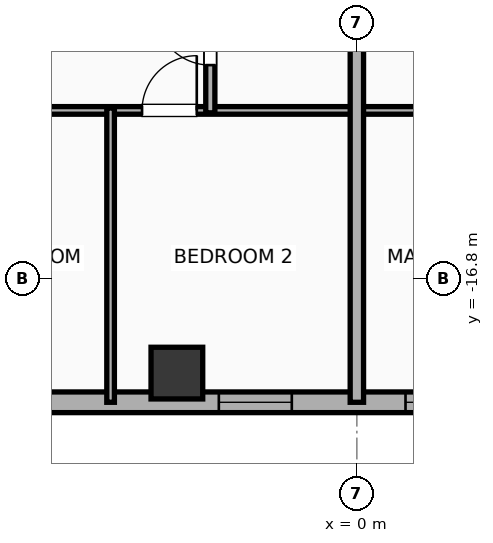
"""IFC4 building model, lengths in metres.
Left out: names, types, materials, properties, quantities, classifications, styles, units other than length and angle.
Written with IfcOpenShell. Run it as: python <this file> out.ifc"""

import sys

from ifc_helpers import new_model, si_unit, direction, frame, frame_2d, origin, origin_2d, place, context, subcontext, project, spatial, rectangle, hollow_rectangle, extrude, element, fill, save


model = new_model("IFC4")
c1 = context("Model", 3, precision=1e-05, world=origin(), true_north=direction((0.0, 1.0)))
c2 = subcontext(c1, "Body", "Model", "MODEL_VIEW")
j1 = project(units=[si_unit("LENGTHUNIT", "METRE"), si_unit("PLANEANGLEUNIT", "RADIAN")], contexts=[c1])
p1 = place(None, origin())
s1 = spatial("IfcSite", under=j1, at=p1, CompositionType="ELEMENT")
p2 = place(p1, origin())
s2 = spatial("IfcBuilding", under=s1, at=p2, CompositionType="ELEMENT")
p3 = place(p2, frame((0.0, 0.0, 215.8)))
s3 = spatial("IfcBuildingStorey", under=s2, at=p3, CompositionType="ELEMENT", Elevation=215.8)
p4 = place(p3, frame((-2.96, -18.35, 0.0), z_axis=(0.0, 0.0, 1.0), x_axis=(1.0, 0.0, 0.0)))
e1 = element("IfcColumn", 1, at=p4, inside=s3, PredefinedType="COLUMN", context=c2, shape_type="SweptSolid", body=[
    extrude(hollow_rectangle(XDim=0.85, YDim=0.85, WallThickness=0.028, at=origin_2d()), origin(), (0.0, 0.0, 1.0), 3.9),
])
p5 = place(p3, frame((26.783, -18.83, 0.0), z_axis=(0.0, 0.0, 1.0), x_axis=(-1.0, 0.0, 0.0)))
e2 = element("IfcWall", 2, at=p5, inside=s3, PredefinedType="ELEMENTEDWALL", context=c2, shape_type="SweptSolid", body=[
    extrude(rectangle(XDim=49.566, YDim=0.34, at=frame_2d((24.783, 0.0))), origin(), (0.0, 0.0, 1.0), 3.65),
])
p6 = place(p5, frame((23.583, 0.0, 0.75)))
e3 = element("IfcOpeningElement", 3, at=p6, cuts=e2, PredefinedType="OPENING", context=c2, shape_type="SweptSolid", body=[
    extrude(rectangle(XDim=2.4, YDim=2.1, at=frame_2d((1.2, 1.05))), frame((0.0, 0.18, 0.0), z_axis=(0.0, -1.0, 0.0), x_axis=(1.0, 0.0, 0.0)), (0.0, 0.0, 1.0), 0.36),
])
p7 = place(p5, frame((41.756, 0.0, 0.75)))
e4 = element("IfcOpeningElement", 4, at=p7, cuts=e2, PredefinedType="OPENING", context=c2, shape_type="SweptSolid", body=[
    extrude(rectangle(XDim=2.4, YDim=2.1, at=frame_2d((1.2, 1.05))), frame((0.0, 0.18, 0.0), z_axis=(0.0, -1.0, 0.0), x_axis=(1.0, 0.0, 0.0)), (0.0, 0.0, 1.0), 0.36),
])
p8 = place(p5, frame((47.222, 0.0, 0.75)))
e5 = element("IfcOpeningElement", 5, at=p8, cuts=e2, PredefinedType="OPENING", context=c2, shape_type="SweptSolid", body=[
    extrude(rectangle(XDim=1.2, YDim=2.05, at=frame_2d((0.6, 1.025))), frame((0.0, 0.18, 0.0), z_axis=(0.0, -1.0, 0.0), x_axis=(1.0, 0.0, 0.0)), (0.0, 0.0, 1.0), 0.36),
])
p9 = place(p5, frame((45.08, 0.0, 0.75)))
e6 = element("IfcOpeningElement", 6, at=p9, cuts=e2, PredefinedType="OPENING", context=c2, shape_type="SweptSolid", body=[
    extrude(rectangle(XDim=1.2, YDim=2.05, at=frame_2d((0.6, 1.025))), frame((0.0, 0.18, 0.0), z_axis=(0.0, -1.0, 0.0), x_axis=(1.0, 0.0, 0.0)), (0.0, 0.0, 1.0), 0.36),
])
p10 = place(p5, frame((37.289, 0.0, 0.75)))
e7 = element("IfcOpeningElement", 7, at=p10, cuts=e2, PredefinedType="OPENING", context=c2, shape_type="SweptSolid", body=[
    extrude(rectangle(XDim=1.2, YDim=2.05, at=frame_2d((0.6, 1.025))), frame((0.0, 0.18, 0.0), z_axis=(0.0, -1.0, 0.0), x_axis=(1.0, 0.0, 0.0)), (0.0, 0.0, 1.0), 0.36),
])
p11 = place(p5, frame((16.115, 0.0, 0.75)))
e8 = element("IfcOpeningElement", 8, at=p11, cuts=e2, PredefinedType="OPENING", context=c2, shape_type="SweptSolid", body=[
    extrude(rectangle(XDim=1.2, YDim=2.05, at=frame_2d((0.6, 1.025))), frame((0.0, 0.18, 0.0), z_axis=(0.0, -1.0, 0.0), x_axis=(1.0, 0.0, 0.0)), (0.0, 0.0, 1.0), 0.36),
])
p12 = place(p5, frame((12.422, 0.0, 0.75)))
e9 = element("IfcOpeningElement", 9, at=p12, cuts=e2, PredefinedType="OPENING", context=c2, shape_type="SweptSolid", body=[
    extrude(rectangle(XDim=1.2, YDim=2.05, at=frame_2d((0.6, 1.025))), frame((0.0, 0.18, 0.0), z_axis=(0.0, -1.0, 0.0), x_axis=(1.0, 0.0, 0.0)), (0.0, 0.0, 1.0), 0.36),
])
p13 = place(p5, frame((8.09, 0.0, 0.75)))
e10 = element("IfcOpeningElement", 10, at=p13, cuts=e2, PredefinedType="OPENING", context=c2, shape_type="SweptSolid", body=[
    extrude(rectangle(XDim=1.2, YDim=2.05, at=frame_2d((0.6, 1.025))), frame((0.0, 0.18, 0.0), z_axis=(0.0, -1.0, 0.0), x_axis=(1.0, 0.0, 0.0)), (0.0, 0.0, 1.0), 0.36),
])
p14 = place(p5, frame((4.637, 0.0, 0.75)))
e11 = element("IfcOpeningElement", 11, at=p14, cuts=e2, PredefinedType="OPENING", context=c2, shape_type="SweptSolid", body=[
    extrude(rectangle(XDim=1.2, YDim=2.05, at=frame_2d((0.6, 1.025))), frame((0.0, 0.18, 0.0), z_axis=(0.0, -1.0, 0.0), x_axis=(1.0, 0.0, 0.0)), (0.0, 0.0, 1.0), 0.36),
])
p15 = place(p5, frame((1.811, 0.0, 0.75)))
e12 = element("IfcOpeningElement", 12, at=p15, cuts=e2, PredefinedType="OPENING", context=c2, shape_type="SweptSolid", body=[
    extrude(rectangle(XDim=1.2, YDim=2.05, at=frame_2d((0.6, 1.025))), frame((0.0, 0.18, 0.0), z_axis=(0.0, -1.0, 0.0), x_axis=(1.0, 0.0, 0.0)), (0.0, 0.0, 1.0), 0.36),
])
p16 = place(p5, frame((32.253, 0.0, 0.75)))
e13 = element("IfcOpeningElement", 13, at=p16, cuts=e2, PredefinedType="OPENING", context=c2, shape_type="SweptSolid", body=[
    extrude(rectangle(XDim=1.2, YDim=2.05, at=frame_2d((0.6, 1.025))), frame((0.0, 0.18, 0.0), z_axis=(0.0, -1.0, 0.0), x_axis=(1.0, 0.0, 0.0)), (0.0, 0.0, 1.0), 0.36),
])
p17 = place(p5, frame((27.853, 0.0, 0.75)))
e14 = element("IfcOpeningElement", 14, at=p17, cuts=e2, PredefinedType="OPENING", context=c2, shape_type="SweptSolid", body=[
    extrude(rectangle(XDim=1.2, YDim=2.05, at=frame_2d((0.6, 1.025))), frame((0.0, 0.18, 0.0), z_axis=(0.0, -1.0, 0.0), x_axis=(1.0, 0.0, 0.0)), (0.0, 0.0, 1.0), 0.36),
])
p18 = place(p5, frame((20.473, 0.0, 0.75)))
e15 = element("IfcOpeningElement", 15, at=p18, cuts=e2, PredefinedType="OPENING", context=c2, shape_type="SweptSolid", body=[
    extrude(rectangle(XDim=1.2, YDim=2.05, at=frame_2d((0.6, 1.025))), frame((0.0, 0.18, 0.0), z_axis=(0.0, -1.0, 0.0), x_axis=(1.0, 0.0, 0.0)), (0.0, 0.0, 1.0), 0.36),
])
p19 = place(p3, frame((-8.08, -14.03, 0.0), z_axis=(0.0, 0.0, 1.0), x_axis=(1.0, 0.0, 0.0)))
e16 = element("IfcWall", 16, at=p19, inside=s3, PredefinedType="PARTITIONING", context=c2, shape_type="SweptSolid", body=[
    extrude(rectangle(XDim=8.06, YDim=0.125, at=frame_2d((4.03, 0.0))), origin(), (0.0, 0.0, 1.0), 3.65),
])
p20 = place(p19, frame((1.323, 0.0, 0.0)))
e17 = element("IfcOpeningElement", 17, at=p20, cuts=e16, PredefinedType="OPENING", context=c2, shape_type="SweptSolid", body=[
    extrude(rectangle(XDim=0.9, YDim=2.05, at=frame_2d((0.45, 1.025))), frame((0.0, 0.073, 0.0), z_axis=(0.0, -1.0, 0.0), x_axis=(1.0, 0.0, 0.0)), (0.0, 0.0, 1.0), 0.145),
])
p21 = place(p19, frame((4.547, 0.0, 0.0)))
e18 = element("IfcOpeningElement", 18, at=p21, cuts=e16, PredefinedType="OPENING", context=c2, shape_type="SweptSolid", body=[
    extrude(rectangle(XDim=0.9, YDim=2.05, at=frame_2d((0.45, 1.025))), frame((0.0, 0.073, 0.0), z_axis=(0.0, -1.0, 0.0), x_axis=(1.0, 0.0, 0.0)), (0.0, 0.0, 1.0), 0.145),
])
p22 = place(p3, frame((-2.41, -14.07, 0.0), z_axis=(0.0, 0.0, 1.0), x_axis=(0.0, 1.0, 0.0)))
e19 = element("IfcWall", 19, at=p22, inside=s3, PredefinedType="PLUMBINGWALL", context=c2, shape_type="SweptSolid", body=[
    extrude(rectangle(XDim=2.47, YDim=0.15, at=frame_2d((1.235, 0.0))), origin(), (0.0, 0.0, 1.0), 3.65),
])
p23 = place(p22, frame((0.785, 0.0, 0.0)))
e20 = element("IfcOpeningElement", 20, at=p23, cuts=e19, PredefinedType="OPENING", context=c2, shape_type="SweptSolid", body=[
    extrude(rectangle(XDim=0.9, YDim=2.05, at=frame_2d((0.45, 1.025))), frame((0.0, 0.085, 0.0), z_axis=(0.0, -1.0, 0.0), x_axis=(1.0, 0.0, 0.0)), (0.0, 0.0, 1.0), 0.17),
])
p24 = place(p3, frame((-4.05, -18.83, 0.0), z_axis=(0.0, 0.0, 1.0), x_axis=(0.0, 1.0, 0.0)))
e21 = element("IfcWall", 21, at=p24, inside=s3, PredefinedType="PARTITIONING", context=c2, shape_type="SweptSolid", body=[
    extrude(rectangle(XDim=4.84, YDim=0.125, at=frame_2d((2.42, 0.0))), origin(), (0.0, 0.0, 1.0), 3.65),
])
p25 = place(p3, frame((0.02, -14.03, 0.0), z_axis=(0.0, 0.0, 1.0), x_axis=(1.0, 0.0, 0.0)))
e22 = element("IfcWall", 22, at=p25, inside=s3, PredefinedType="PARTITIONING", context=c2, shape_type="SweptSolid", body=[
    extrude(rectangle(XDim=8.06, YDim=0.125, at=frame_2d((4.03, 0.0))), origin(), (0.0, 0.0, 1.0), 3.65),
])
p26 = place(p25, frame((1.323, 0.0, 0.0)))
e23 = element("IfcOpeningElement", 23, at=p26, cuts=e22, PredefinedType="OPENING", context=c2, shape_type="SweptSolid", body=[
    extrude(rectangle(XDim=0.9, YDim=2.05, at=frame_2d((0.45, 1.025))), frame((0.0, 0.073, 0.0), z_axis=(0.0, -1.0, 0.0), x_axis=(1.0, 0.0, 0.0)), (0.0, 0.0, 1.0), 0.145),
])
p27 = place(p25, frame((5.837, 0.0, 0.0)))
e24 = element("IfcOpeningElement", 24, at=p27, cuts=e22, PredefinedType="OPENING", context=c2, shape_type="SweptSolid", body=[
    extrude(rectangle(XDim=0.9, YDim=2.05, at=frame_2d((0.45, 1.025))), frame((0.0, 0.073, 0.0), z_axis=(0.0, -1.0, 0.0), x_axis=(1.0, 0.0, 0.0)), (0.0, 0.0, 1.0), 0.145),
])
p28 = place(p3, frame((0.0, -18.83, 0.0), z_axis=(0.0, 0.0, 1.0), x_axis=(0.0, 1.0, 0.0)))
e25 = element("IfcWall", 25, at=p28, inside=s3, PredefinedType="PARTITIONING", context=c2, shape_type="SweptSolid", body=[
    extrude(rectangle(XDim=9.64, YDim=0.22, at=frame_2d((4.82, 0.0))), origin(), (0.0, 0.0, 1.0), 3.65),
])
p29 = place(p6, origin())
e26 = element("IfcWindow", 26, at=p29, inside=s3, PartitioningType="SINGLE_PANEL", PredefinedType="WINDOW", context=c2, shape_type="SweptSolid", body=[
    extrude(rectangle(XDim=2.4, YDim=2.1, at=frame_2d((1.2, 1.05))), frame((0.0, 0.03, 0.0), z_axis=(0.0, -1.0, 0.0), x_axis=(1.0, 0.0, 0.0)), (0.0, 0.0, 1.0), 0.06),
])
fill(e3, e26)
p30 = place(p17, origin())
e27 = element("IfcWindow", 27, at=p30, inside=s3, PartitioningType="SINGLE_PANEL", PredefinedType="WINDOW", context=c2, shape_type="SweptSolid", body=[
    extrude(rectangle(XDim=1.2, YDim=2.05, at=frame_2d((0.6, 1.025))), frame((0.0, 0.03, 0.0), z_axis=(0.0, -1.0, 0.0), x_axis=(1.0, 0.0, 0.0)), (0.0, 0.0, 1.0), 0.06),
])
fill(e14, e27)
p31 = place(p21, origin())
e28 = element("IfcDoor", 28, at=p31, inside=s3, OperationType="SINGLE_SWING_RIGHT", PredefinedType="DOOR", context=c2, shape_type="SweptSolid", body=[
    extrude(rectangle(XDim=0.9, YDim=2.05, at=frame_2d((0.45, 1.025))), frame((0.0, 0.025, 0.0), z_axis=(0.0, -1.0, 0.0), x_axis=(1.0, 0.0, 0.0)), (0.0, 0.0, 1.0), 0.05),
])
fill(e18, e28)
p32 = place(p23, origin())
e29 = element("IfcDoor", 29, at=p32, inside=s3, OperationType="SINGLE_SWING_RIGHT", PredefinedType="DOOR", context=c2, shape_type="SweptSolid", body=[
    extrude(rectangle(XDim=0.9, YDim=2.05, at=frame_2d((0.45, 1.025))), frame((0.0, 0.025, 0.0), z_axis=(0.0, -1.0, 0.0), x_axis=(1.0, 0.0, 0.0)), (0.0, 0.0, 1.0), 0.05),
])
fill(e20, e29)
save(model, sys.argv[1])
